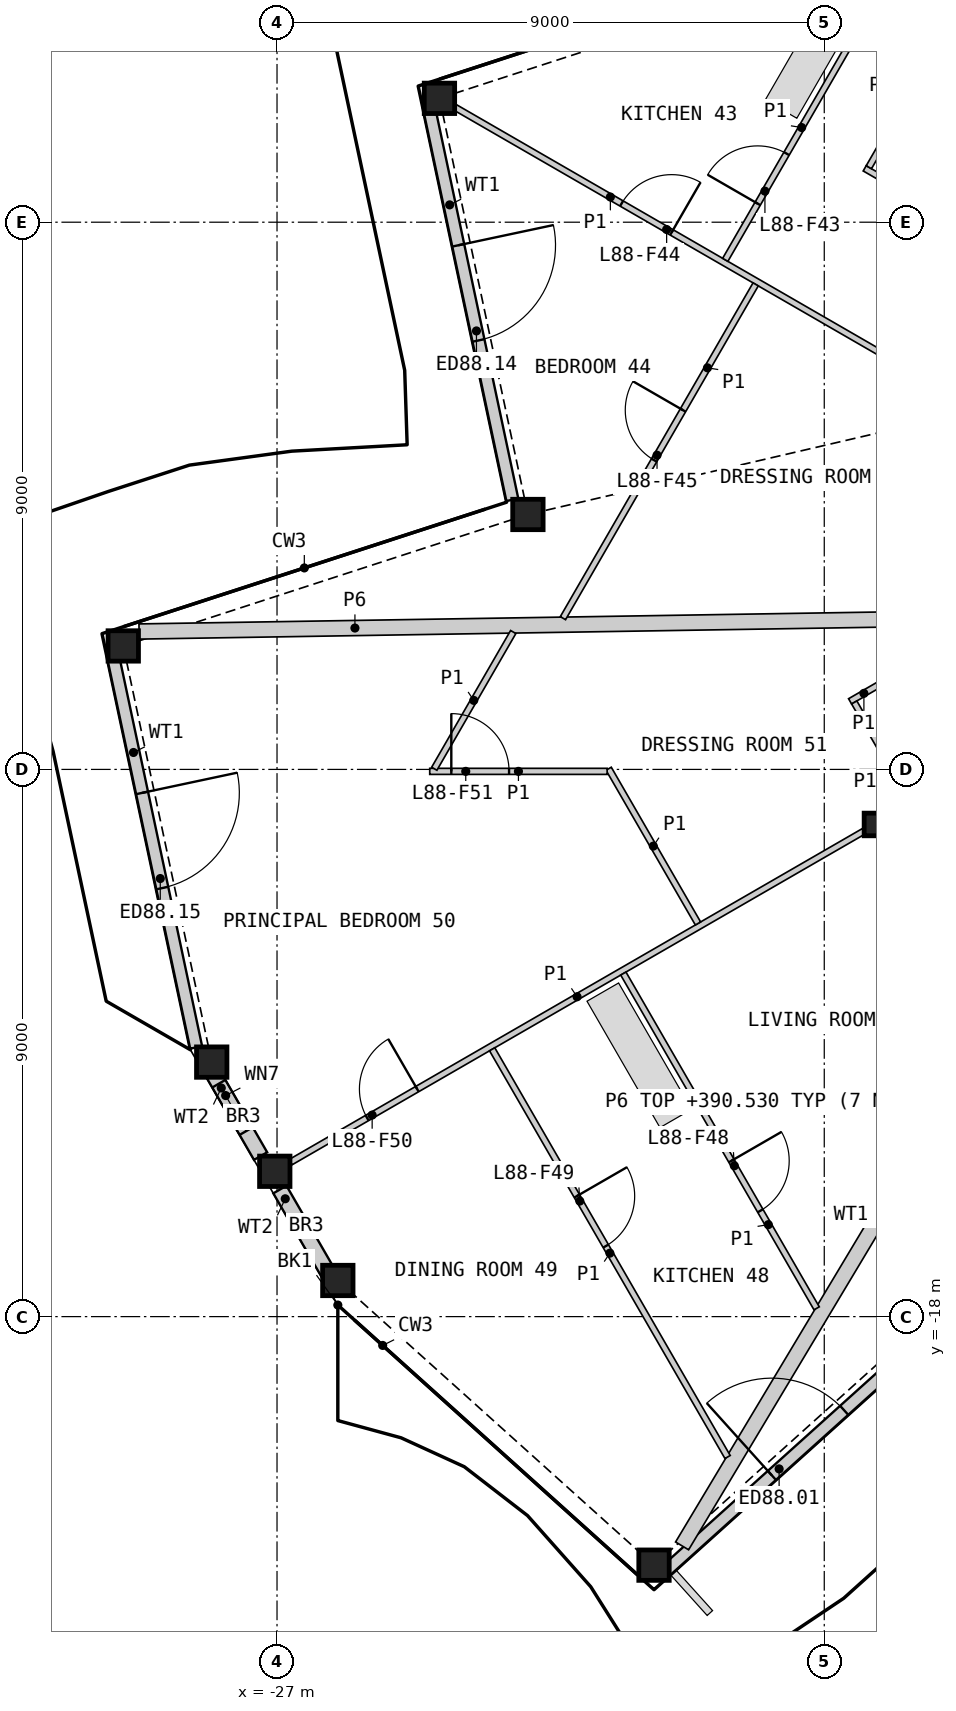
"""IFC4 building model, lengths in metres.
Left out: names, types, materials, properties, quantities, classifications, styles, units other than length and angle.
Written with IfcOpenShell. Run it as: python <this file> out.ifc"""

import sys

from ifc_helpers import new_model, si_unit, direction, frame, frame_2d, origin, origin_2d, place, context, subcontext, project, spatial, rectangle, hollow_rectangle, i_section, extrude, element, fill, save


model = new_model("IFC4")
c1 = context("Model", 3, precision=1e-05, world=origin(), true_north=direction((0.0, 1.0)))
c2 = subcontext(c1, "Body", "Model", "MODEL_VIEW")
j1 = project(units=[si_unit("LENGTHUNIT", "METRE"), si_unit("PLANEANGLEUNIT", "RADIAN")], contexts=[c1])
p1 = place(None, origin())
s1 = spatial("IfcSite", under=j1, at=p1, CompositionType="ELEMENT")
p2 = place(p1, origin())
s2 = spatial("IfcBuilding", under=s1, at=p2, CompositionType="ELEMENT")
p3 = place(p2, frame((0.0, 0.0, 388.2)))
s3 = spatial("IfcBuildingStorey", under=s2, at=p3, CompositionType="ELEMENT", Elevation=388.2)
for number, where, z_axis, x_axis in (
    (1, (-26.0, -17.406, 0.0), (0.0, 0.0, 1.0), (1.0, 0.0, 0.0)),
    (2, (-20.8, -22.088, 0.0), (0.0, 0.0, 1.0), (1.0, 0.0, 0.0)),
    (3, (-24.329, 2.037, 0.0), (0.0, 0.0, 1.0), (1.0, 0.0, 0.0)),
    (4, (-22.874, -4.807, 0.0), (0.0, 0.0, 1.0), (1.0, 0.0, 0.0)),
    (5, (-29.529, -6.969, 0.0), (0.0, 0.0, 1.0), (1.0, 0.0, 0.0)),
    (6, (-28.074, -13.814, 0.0), (0.0, 0.0, 1.0), (1.0, 0.0, 0.0)),
    (7, (-27.037, -15.61, 0.0), (0.0, 0.0, 1.0), (1.0, 0.0, 0.0)),
):
    element("IfcColumn", number, at=place(p3, frame(where, z_axis=z_axis, x_axis=x_axis)), inside=s3, PredefinedType="COLUMN", context=c2, shape_type="SweptSolid", body=[
        extrude(hollow_rectangle(XDim=0.5, YDim=0.5, WallThickness=0.03, at=origin_2d()), origin(), (0.0, 0.0, 1.0), 3.4),
    ])
p4 = place(p3, frame((-17.157, -9.906, 0.0), z_axis=(0.0, 0.0, 1.0), x_axis=(1.0, 0.0, 0.0)))
e8 = element("IfcColumn", 8, at=p4, inside=s3, PredefinedType="COLUMN", context=c2, shape_type="SweptSolid", body=[
    extrude(i_section(OverallWidth=0.374, OverallDepth=0.372, WebThickness=0.016, FlangeThickness=0.026, at=origin_2d()), origin(), (0.0, 0.0, 1.0), 3.4),
])
p5 = place(p3, frame((-20.595, -22.173, 0.0), z_axis=(0.0, 0.0, 1.0), x_axis=(0.743135582201, 0.669140871915, 0.0)))
e9 = element("IfcWall", 9, at=p5, inside=s3, PredefinedType="SOLIDWALL", context=c2, shape_type="SweptSolid", body=[
    extrude(rectangle(XDim=6.662, YDim=0.2, at=frame_2d((3.331, 0.0))), origin(), (0.0, 0.0, 1.0), 2.634),
])
p6 = place(p5, frame((2.333, 0.0, 0.0)))
e10 = element("IfcOpeningElement", 10, at=p6, cuts=e9, PredefinedType="OPENING", context=c2, shape_type="SweptSolid", body=[
    extrude(rectangle(XDim=1.6, YDim=2.25, at=frame_2d((0.8, 1.125))), frame((0.0, 0.11, 0.0), z_axis=(0.0, -1.0, 0.0), x_axis=(1.0, 0.0, 0.0)), (0.0, 0.0, 1.0), 0.22),
])
p7 = place(p3, frame((-24.505, 1.902, 0.0), z_axis=(0.0, 0.0, 1.0), x_axis=(0.207917488951, -0.978146368285, 0.0)))
e11 = element("IfcWall", 11, at=p7, inside=s3, PredefinedType="SOLIDWALL", context=c2, shape_type="SweptSolid", body=[
    extrude(rectangle(XDim=6.612, YDim=0.2, at=frame_2d((3.306, 0.0))), origin(), (0.0, 0.0, 1.0), 2.634),
])
p8 = place(p7, frame((2.333, 0.0, 0.0)))
e12 = element("IfcOpeningElement", 12, at=p8, cuts=e11, PredefinedType="OPENING", context=c2, shape_type="SweptSolid", body=[
    extrude(rectangle(XDim=1.6, YDim=2.25, at=frame_2d((0.8, 1.125))), frame((0.0, 0.11, 0.0), z_axis=(0.0, -1.0, 0.0), x_axis=(1.0, 0.0, 0.0)), (0.0, 0.0, 1.0), 0.22),
])
p9 = place(p3, frame((-29.705, -7.105, 0.0), z_axis=(0.0, 0.0, 1.0), x_axis=(0.207924998532, -0.978144771997, 0.0)))
e13 = element("IfcWall", 13, at=p9, inside=s3, PredefinedType="SOLIDWALL", context=c2, shape_type="SweptSolid", body=[
    extrude(rectangle(XDim=6.612, YDim=0.2, at=frame_2d((3.306, 0.0))), origin(), (0.0, 0.0, 1.0), 2.634),
])
p10 = place(p9, frame((2.333, 0.0, 0.0)))
e14 = element("IfcOpeningElement", 14, at=p10, cuts=e13, PredefinedType="OPENING", context=c2, shape_type="SweptSolid", body=[
    extrude(rectangle(XDim=1.6, YDim=2.25, at=frame_2d((0.8, 1.125))), frame((0.0, 0.11, 0.0), z_axis=(0.0, -1.0, 0.0), x_axis=(1.0, 0.0, 0.0)), (0.0, 0.0, 1.0), 0.22),
])
p11 = place(p3, frame((-28.132, -13.866, 0.0), z_axis=(0.0, 0.0, 1.0), x_axis=(0.499975693202, -0.866039436866, 0.0)))
e15 = element("IfcWall", 15, at=p11, inside=s3, PredefinedType="SOLIDWALL", context=c2, shape_type="SweptSolid", body=[
    extrude(rectangle(XDim=1.725, YDim=0.25, at=frame_2d((0.862, 0.0))), origin(), (0.0, 0.0, 1.0), 2.634),
])
p12 = place(p11, frame((0.35, 0.0, 1.8)))
e16 = element("IfcOpeningElement", 16, at=p12, cuts=e15, PredefinedType="OPENING", context=c2, shape_type="SweptSolid", body=[
    extrude(rectangle(XDim=0.9, YDim=0.6, at=frame_2d((0.45, 0.3))), frame((0.0, 0.135, 0.0), z_axis=(0.0, -1.0, 0.0), x_axis=(1.0, 0.0, 0.0)), (0.0, 0.0, 1.0), 0.27),
])
p13 = place(p3, frame((-26.953, -15.91, 0.0), z_axis=(0.0, 0.0, 1.0), x_axis=(0.500027377864, -0.86600959659, 0.0)))
e17 = element("IfcWall", 17, at=p13, inside=s3, PredefinedType="SOLIDWALL", context=c2, shape_type="SweptSolid", body=[
    extrude(rectangle(XDim=1.756, YDim=0.25, at=frame_2d((0.878, 0.0))), origin(), (0.0, 0.0, 1.0), 2.634),
])
p14 = place(p3, frame((-20.338, -21.771, 0.0), z_axis=(0.0, 0.0, 1.0), x_axis=(0.513878217441, 0.857863146218, 0.0)))
e18 = element("IfcWall", 18, at=p14, inside=s3, PredefinedType="PARTITIONING", context=c2, shape_type="SweptSolid", body=[
    extrude(rectangle(XDim=13.956, YDim=0.25, at=frame_2d((6.978, 0.0))), origin(), (0.0, 0.0, 1.0), 2.33),
])
p15 = place(p3, frame((-29.269, -6.732, 0.0), z_axis=(0.0, 0.0, 1.0), x_axis=(0.999870533117, 0.016090898164, 0.0)))
e19 = element("IfcWall", 19, at=p15, inside=s3, PredefinedType="PARTITIONING", context=c2, shape_type="SweptSolid", body=[
    extrude(rectangle(XDim=14.202, YDim=0.25, at=frame_2d((7.101, 0.0))), origin(), (0.0, 0.0, 1.0), 2.33),
])
p16 = place(p3, frame((-17.414, 4.049, 0.0), z_axis=(0.0, 0.0, 1.0), x_axis=(0.866033839264, -0.499985389037, 0.0)))
e20 = element("IfcWall", 20, at=p16, inside=s3, PredefinedType="PARTITIONING", context=c2, shape_type="SweptSolid", body=[
    extrude(rectangle(XDim=7.1, YDim=0.25, at=frame_2d((3.55, 0.0))), origin(), (0.0, 0.0, 1.0), 2.33),
])
p17 = place(p3, frame((-24.069, 1.887, 0.0), z_axis=(0.0, 0.0, 1.0), x_axis=(0.866023404247, -0.500003463284, 0.0)))
e21 = element("IfcWall", 21, at=p17, inside=s3, PredefinedType="PARTITIONING", context=c2, shape_type="SweptSolid", body=[
    extrude(rectangle(XDim=11.782, YDim=0.1, at=frame_2d((5.891, 0.0))), origin(), (0.0, 0.0, 1.0), 2.33),
])
p18 = place(p17, frame((3.159, 0.0, 0.0)))
e22 = element("IfcOpeningElement", 22, at=p18, cuts=e21, PredefinedType="OPENING", context=c2, shape_type="SweptSolid", body=[
    extrude(rectangle(XDim=0.95, YDim=2.1, at=frame_2d((0.475, 1.05))), frame((0.0, 0.06, 0.0), z_axis=(0.0, -1.0, 0.0), x_axis=(1.0, 0.0, 0.0)), (0.0, 0.0, 1.0), 0.12),
])
p19 = place(p3, frame((-26.777, -15.46, 0.0), z_axis=(0.0, 0.0, 1.0), x_axis=(0.866019680922, 0.500009912158, 0.0)))
e23 = element("IfcWall", 23, at=p19, inside=s3, PredefinedType="PARTITIONING", context=c2, shape_type="SweptSolid", body=[
    extrude(rectangle(XDim=10.881, YDim=0.1, at=frame_2d((5.44, 0.0))), origin(), (0.0, 0.0, 1.0), 2.33),
])
p20 = place(p19, frame((1.454, 0.0, 0.0)))
e24 = element("IfcOpeningElement", 24, at=p20, cuts=e23, PredefinedType="OPENING", context=c2, shape_type="SweptSolid", body=[
    extrude(rectangle(XDim=0.95, YDim=2.1, at=frame_2d((0.475, 1.05))), frame((0.0, 0.06, 0.0), z_axis=(0.0, -1.0, 0.0), x_axis=(1.0, 0.0, 0.0)), (0.0, 0.0, 1.0), 0.12),
])
p21 = place(p3, frame((-23.462, -13.603, 0.0), z_axis=(0.0, 0.0, 1.0), x_axis=(0.499998111909, -0.866026493871, 0.0)))
e25 = element("IfcWall", 25, at=p21, inside=s3, PredefinedType="PARTITIONING", context=c2, shape_type="SweptSolid", body=[
    extrude(rectangle(XDim=7.743, YDim=0.1, at=frame_2d((3.872, 0.0))), origin(), (0.0, 0.0, 1.0), 2.33),
])
p22 = place(p21, frame((2.788, 0.0, 0.0)))
e26 = element("IfcOpeningElement", 26, at=p22, cuts=e25, PredefinedType="OPENING", context=c2, shape_type="SweptSolid", body=[
    extrude(rectangle(XDim=0.95, YDim=2.1, at=frame_2d((0.475, 1.05))), frame((0.0, 0.06, 0.0), z_axis=(0.0, -1.0, 0.0), x_axis=(1.0, 0.0, 0.0)), (0.0, 0.0, 1.0), 0.12),
])
p23 = place(p3, frame((-21.304, -12.358, 0.0), z_axis=(0.0, 0.0, 1.0), x_axis=(0.500000558108, -0.866025081561, 0.0)))
e27 = element("IfcWall", 27, at=p23, inside=s3, PredefinedType="PARTITIONING", context=c2, shape_type="SweptSolid", body=[
    extrude(rectangle(XDim=6.358, YDim=0.1, at=frame_2d((3.179, 0.0))), origin(), (0.0, 0.0, 1.0), 2.33),
])
p24 = place(p23, frame((3.555, 0.0, 0.0)))
e28 = element("IfcOpeningElement", 28, at=p24, cuts=e27, PredefinedType="OPENING", context=c2, shape_type="SweptSolid", body=[
    extrude(rectangle(XDim=0.95, YDim=2.1, at=frame_2d((0.475, 1.05))), frame((0.0, 0.06, 0.0), z_axis=(0.0, -1.0, 0.0), x_axis=(1.0, 0.0, 0.0)), (0.0, 0.0, 1.0), 0.12),
])
p25 = place(p3, frame((-22.298, -6.512, 0.0), z_axis=(0.0, 0.0, 1.0), x_axis=(0.499991387631, 0.866030376081, 0.0)))
e29 = element("IfcWall", 29, at=p25, inside=s3, PredefinedType="PARTITIONING", context=c2, shape_type="SweptSolid", body=[
    extrude(rectangle(XDim=6.339, YDim=0.1, at=frame_2d((3.169, 0.0))), origin(), (0.0, 0.0, 1.0), 2.33),
])
p26 = place(p25, frame((3.0, 0.0, 0.0)))
e30 = element("IfcOpeningElement", 30, at=p26, cuts=e29, PredefinedType="OPENING", context=c2, shape_type="SweptSolid", body=[
    extrude(rectangle(XDim=0.95, YDim=2.1, at=frame_2d((0.475, 1.05))), frame((0.0, 0.06, 0.0), z_axis=(0.0, -1.0, 0.0), x_axis=(1.0, 0.0, 0.0)), (0.0, 0.0, 1.0), 0.12),
])
p27 = place(p3, frame((-19.628, -0.619, 0.0), z_axis=(0.0, 0.0, 1.0), x_axis=(0.499990214365, 0.86603105345, 0.0)))
e31 = element("IfcWall", 31, at=p27, inside=s3, PredefinedType="PARTITIONING", context=c2, shape_type="SweptSolid", body=[
    extrude(rectangle(XDim=5.025, YDim=0.1, at=frame_2d((2.512, 0.0))), origin(), (0.0, 0.0, 1.0), 2.33),
])
p28 = place(p27, frame((1.067, 0.0, 0.0)))
e32 = element("IfcOpeningElement", 32, at=p28, cuts=e31, PredefinedType="OPENING", context=c2, shape_type="SweptSolid", body=[
    extrude(rectangle(XDim=0.95, YDim=2.1, at=frame_2d((0.475, 1.05))), frame((0.0, 0.06, 0.0), z_axis=(0.0, -1.0, 0.0), x_axis=(1.0, 0.0, 0.0)), (0.0, 0.0, 1.0), 0.12),
])
p29 = place(p3, frame((-21.546, -8.989, 0.0), z_axis=(0.0, 0.0, 1.0), x_axis=(0.499919039967, -0.866072141036, 0.0)))
e33 = element("IfcWall", 33, at=p29, inside=s3, PredefinedType="PARTITIONING", context=c2, shape_type="SweptSolid", body=[
    extrude(rectangle(XDim=2.938, YDim=0.1, at=frame_2d((1.469, 0.0))), origin(), (0.0, 0.0, 1.0), 2.33),
])
p30 = place(p3, frame((-24.489, -9.032, 0.0), z_axis=(0.0, 0.0, 1.0), x_axis=(1.0, 0.0, 0.0)))
e34 = element("IfcWall", 34, at=p30, inside=s3, PredefinedType="PARTITIONING", context=c2, shape_type="SweptSolid", body=[
    extrude(rectangle(XDim=2.917, YDim=0.1, at=frame_2d((1.459, 0.0))), origin(), (0.0, 0.0, 1.0), 2.33),
])
p31 = place(p30, frame((0.355, 0.0, 0.0)))
e35 = element("IfcOpeningElement", 35, at=p31, cuts=e34, PredefinedType="OPENING", context=c2, shape_type="SweptSolid", body=[
    extrude(rectangle(XDim=0.95, YDim=2.1, at=frame_2d((0.475, 1.05))), frame((0.0, 0.06, 0.0), z_axis=(0.0, -1.0, 0.0), x_axis=(1.0, 0.0, 0.0)), (0.0, 0.0, 1.0), 0.12),
])
p32 = place(p3, frame((-17.335, 0.886, 0.0), z_axis=(0.0, 0.0, 1.0), x_axis=(0.866032775405, -0.499987231761, 0.0)))
e36 = element("IfcWall", 36, at=p32, inside=s3, PredefinedType="PARTITIONING", context=c2, shape_type="SweptSolid", body=[
    extrude(rectangle(XDim=2.9, YDim=0.1, at=frame_2d((1.45, 0.0))), origin(), (0.0, 0.0, 1.0), 2.33),
])
p33 = place(p32, frame((0.25, 0.0, 0.0)))
e37 = element("IfcOpeningElement", 37, at=p33, cuts=e36, PredefinedType="OPENING", context=c2, shape_type="SweptSolid", body=[
    extrude(rectangle(XDim=0.95, YDim=2.1, at=frame_2d((0.475, 1.05))), frame((0.0, 0.06, 0.0), z_axis=(0.0, -1.0, 0.0), x_axis=(1.0, 0.0, 0.0)), (0.0, 0.0, 1.0), 0.12),
])
p34 = place(p3, frame((-24.414, -8.989, 0.0), z_axis=(0.0, 0.0, 1.0), x_axis=(0.500042595688, 0.866000809756, 0.0)))
e38 = element("IfcWall", 38, at=p34, inside=s3, PredefinedType="PARTITIONING", context=c2, shape_type="SweptSolid", body=[
    extrude(rectangle(XDim=2.596, YDim=0.1, at=frame_2d((1.298, 0.0))), origin(), (0.0, 0.0, 1.0), 2.33),
])
p35 = place(p3, frame((-17.575, -7.881, 0.0), z_axis=(0.0, 0.0, 1.0), x_axis=(0.866036909293, 0.499980071345, 0.0)))
e39 = element("IfcWall", 39, at=p35, inside=s3, PredefinedType="PARTITIONING", context=c2, shape_type="SweptSolid", body=[
    extrude(rectangle(XDim=2.625, YDim=0.1, at=frame_2d((1.312, 0.0))), origin(), (0.0, 0.0, 1.0), 2.33),
])
p36 = place(p3, frame((-17.267, 0.905, 0.0), z_axis=(0.0, 0.0, 1.0), x_axis=(0.499976333282, 0.866039067339, 0.0)))
e40 = element("IfcWall", 40, at=p36, inside=s3, PredefinedType="PARTITIONING", context=c2, shape_type="SweptSolid", body=[
    extrude(rectangle(XDim=2.525, YDim=0.1, at=frame_2d((1.262, 0.0))), origin(), (0.0, 0.0, 1.0), 2.33),
])
p37 = place(p3, frame((-17.507, -7.899, 0.0), z_axis=(0.0, 0.0, 1.0), x_axis=(0.500011643316, -0.866018681408, 0.0)))
e41 = element("IfcWall", 41, at=p37, inside=s3, PredefinedType="PARTITIONING", context=c2, shape_type="SweptSolid", body=[
    extrude(rectangle(XDim=1.973, YDim=0.1, at=frame_2d((0.987, 0.0))), origin(), (0.0, 0.0, 1.0), 2.33),
])
p38 = place(p6, origin())
e42 = element("IfcDoor", 42, at=p38, inside=s3, OperationType="DOUBLE_DOOR_SINGLE_SWING", PredefinedType="DOOR", context=c2, shape_type="SweptSolid", body=[
    extrude(rectangle(XDim=1.6, YDim=2.25, at=frame_2d((0.8, 1.125))), frame((0.0, 0.025, 0.0), z_axis=(0.0, -1.0, 0.0), x_axis=(1.0, 0.0, 0.0)), (0.0, 0.0, 1.0), 0.05),
])
fill(e10, e42)
p39 = place(p8, origin())
e43 = element("IfcDoor", 43, at=p39, inside=s3, OperationType="DOUBLE_DOOR_SINGLE_SWING", PredefinedType="DOOR", context=c2, shape_type="SweptSolid", body=[
    extrude(rectangle(XDim=1.6, YDim=2.25, at=frame_2d((0.8, 1.125))), frame((0.0, 0.025, 0.0), z_axis=(0.0, -1.0, 0.0), x_axis=(1.0, 0.0, 0.0)), (0.0, 0.0, 1.0), 0.05),
])
fill(e12, e43)
p40 = place(p10, origin())
e44 = element("IfcDoor", 44, at=p40, inside=s3, OperationType="DOUBLE_DOOR_SINGLE_SWING", PredefinedType="DOOR", context=c2, shape_type="SweptSolid", body=[
    extrude(rectangle(XDim=1.6, YDim=2.25, at=frame_2d((0.8, 1.125))), frame((0.0, 0.025, 0.0), z_axis=(0.0, -1.0, 0.0), x_axis=(1.0, 0.0, 0.0)), (0.0, 0.0, 1.0), 0.05),
])
fill(e14, e44)
p41 = place(p12, origin())
e45 = element("IfcWindow", 45, at=p41, inside=s3, PartitioningType="SINGLE_PANEL", PredefinedType="WINDOW", context=c2, shape_type="SweptSolid", body=[
    extrude(rectangle(XDim=0.9, YDim=0.6, at=frame_2d((0.45, 0.3))), frame((0.0, 0.03, 0.0), z_axis=(0.0, -1.0, 0.0), x_axis=(1.0, 0.0, 0.0)), (0.0, 0.0, 1.0), 0.06),
])
fill(e16, e45)
p42 = place(p28, origin())
e46 = element("IfcDoor", 46, at=p42, inside=s3, OperationType="SINGLE_SWING_LEFT", PredefinedType="DOOR", context=c2, shape_type="SweptSolid", body=[
    extrude(rectangle(XDim=0.95, YDim=2.1, at=frame_2d((0.475, 1.05))), frame((0.0, 0.025, 0.0), z_axis=(0.0, -1.0, 0.0), x_axis=(1.0, 0.0, 0.0)), (0.0, 0.0, 1.0), 0.05),
])
fill(e32, e46)
p43 = place(p18, origin())
e47 = element("IfcDoor", 47, at=p43, inside=s3, OperationType="SINGLE_SWING_RIGHT", PredefinedType="DOOR", context=c2, shape_type="SweptSolid", body=[
    extrude(rectangle(XDim=0.95, YDim=2.1, at=frame_2d((0.475, 1.05))), frame((0.0, 0.025, 0.0), z_axis=(0.0, -1.0, 0.0), x_axis=(1.0, 0.0, 0.0)), (0.0, 0.0, 1.0), 0.05),
])
fill(e22, e47)
p44 = place(p26, origin())
e48 = element("IfcDoor", 48, at=p44, inside=s3, OperationType="SINGLE_SWING_RIGHT", PredefinedType="DOOR", context=c2, shape_type="SweptSolid", body=[
    extrude(rectangle(XDim=0.95, YDim=2.1, at=frame_2d((0.475, 1.05))), frame((0.0, 0.025, 0.0), z_axis=(0.0, -1.0, 0.0), x_axis=(1.0, 0.0, 0.0)), (0.0, 0.0, 1.0), 0.05),
])
fill(e30, e48)
p45 = place(p24, origin())
e49 = element("IfcDoor", 49, at=p45, inside=s3, OperationType="SINGLE_SWING_LEFT", PredefinedType="DOOR", context=c2, shape_type="SweptSolid", body=[
    extrude(rectangle(XDim=0.95, YDim=2.1, at=frame_2d((0.475, 1.05))), frame((0.0, 0.025, 0.0), z_axis=(0.0, -1.0, 0.0), x_axis=(1.0, 0.0, 0.0)), (0.0, 0.0, 1.0), 0.05),
])
fill(e28, e49)
p46 = place(p22, origin())
e50 = element("IfcDoor", 50, at=p46, inside=s3, OperationType="SINGLE_SWING_LEFT", PredefinedType="DOOR", context=c2, shape_type="SweptSolid", body=[
    extrude(rectangle(XDim=0.95, YDim=2.1, at=frame_2d((0.475, 1.05))), frame((0.0, 0.025, 0.0), z_axis=(0.0, -1.0, 0.0), x_axis=(1.0, 0.0, 0.0)), (0.0, 0.0, 1.0), 0.05),
])
fill(e26, e50)
p47 = place(p20, origin())
e51 = element("IfcDoor", 51, at=p47, inside=s3, OperationType="SINGLE_SWING_RIGHT", PredefinedType="DOOR", context=c2, shape_type="SweptSolid", body=[
    extrude(rectangle(XDim=0.95, YDim=2.1, at=frame_2d((0.475, 1.05))), frame((0.0, 0.025, 0.0), z_axis=(0.0, -1.0, 0.0), x_axis=(1.0, 0.0, 0.0)), (0.0, 0.0, 1.0), 0.05),
])
fill(e24, e51)
p48 = place(p31, origin())
e52 = element("IfcDoor", 52, at=p48, inside=s3, OperationType="SINGLE_SWING_LEFT", PredefinedType="DOOR", context=c2, shape_type="SweptSolid", body=[
    extrude(rectangle(XDim=0.95, YDim=2.1, at=frame_2d((0.475, 1.05))), frame((0.0, 0.025, 0.0), z_axis=(0.0, -1.0, 0.0), x_axis=(1.0, 0.0, 0.0)), (0.0, 0.0, 1.0), 0.05),
])
fill(e35, e52)
save(model, sys.argv[1])
